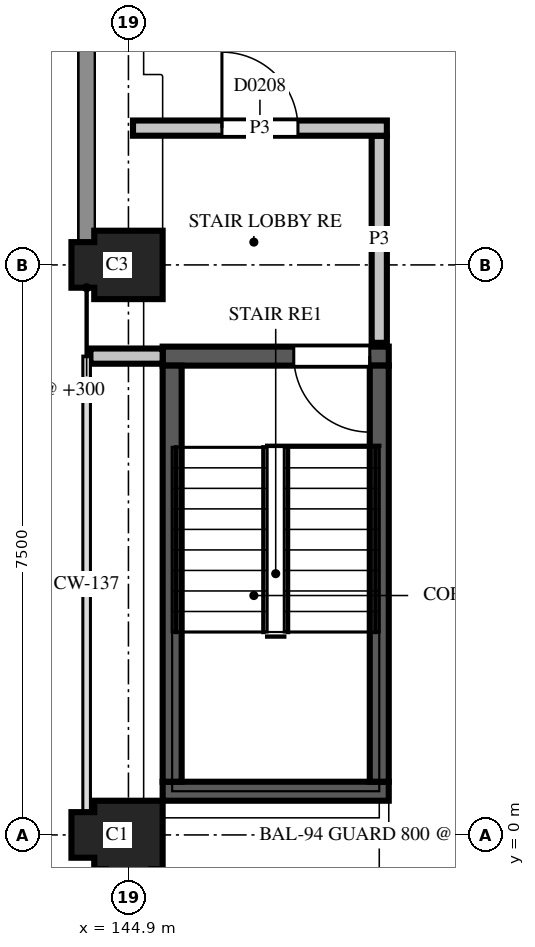
"""IFC4 building model, lengths in metres.
Left out: names, types, materials, properties, quantities, classifications, styles, units other than length and angle.
Written with IfcOpenShell. Run it as: python <this file> out.ifc"""

import sys

from ifc_helpers import new_model, si_unit, direction, frame, frame_2d, origin, place, context, subcontext, project, spatial, polyline, rectangle, outline, extrude, element, fill, save


model = new_model("IFC4")
c1 = context("Model", 3, precision=1e-05, world=origin(), true_north=direction((0.0, 1.0)))
c2 = subcontext(c1, "Body", "Model", "MODEL_VIEW")
j1 = project(units=[si_unit("LENGTHUNIT", "METRE"), si_unit("PLANEANGLEUNIT", "RADIAN")], contexts=[c1])
p1 = place(None, origin())
s1 = spatial("IfcSite", under=j1, at=p1, CompositionType="ELEMENT")
p2 = place(p1, origin())
s2 = spatial("IfcBuilding", under=s1, at=p2, CompositionType="ELEMENT")
p3 = place(p2, frame((0.0, 0.0, 8.2)))
s3 = spatial("IfcBuildingStorey", under=s2, at=p3, CompositionType="ELEMENT", Elevation=8.2)
p4 = place(p3, frame((144.9, 0.0, 0.0), z_axis=(0.0, 0.0, 1.0), x_axis=(-1.0, 0.0, 0.0)))
e1 = element("IfcColumn", 1, at=p4, inside=s3, PredefinedType="COLUMN", context=c2, shape_type="SweptSolid", body=[
    extrude(outline(polyline([(-0.45, -0.45), (0.45, -0.45), (0.45, -0.3), (0.75, -0.3), (0.75, 0.3), (0.45, 0.3), (0.45, 0.45), (0.3, 0.45), (0.3, 0.75), (-0.3, 0.75), (-0.3, 0.45), (-0.45, 0.45), (-0.45, -0.45)])), origin(), (0.0, 0.0, 1.0), 3.7),
])
p5 = place(p3, frame((144.9, 7.5, 0.0), z_axis=(0.0, 0.0, 1.0), x_axis=(-1.0, 0.0, 0.0)))
e2 = element("IfcColumn", 2, at=p5, inside=s3, PredefinedType="COLUMN", context=c2, shape_type="SweptSolid", body=[
    extrude(outline(polyline([(-0.45, -0.45), (0.45, -0.45), (0.45, -0.3), (0.75, -0.3), (0.75, 0.3), (0.45, 0.3), (0.45, 0.45), (-0.45, 0.45), (-0.45, -0.45)])), origin(), (0.0, 0.0, 1.0), 3.7),
])
p6 = place(p3, frame((145.35, 0.575, 0.0), z_axis=(0.0, 0.0, 1.0), x_axis=(1.0, 0.0, 0.0)))
e3 = element("IfcWall", 3, at=p6, inside=s3, PredefinedType="SHEAR", context=c2, shape_type="SweptSolid", body=[
    extrude(rectangle(XDim=2.975, YDim=0.25, at=frame_2d((1.487, 0.0))), origin(), (0.0, 0.0, 1.0), 3.7),
])
p7 = place(p3, frame((145.35, 6.3, 0.0), z_axis=(0.0, 0.0, 1.0), x_axis=(1.0, 0.0, 0.0)))
e4 = element("IfcWall", 4, at=p7, inside=s3, PredefinedType="SHEAR", context=c2, shape_type="SweptSolid", body=[
    extrude(rectangle(XDim=2.975, YDim=0.25, at=frame_2d((1.487, 0.0))), origin(), (0.0, 0.0, 1.0), 3.7),
])
p8 = place(p7, frame((1.725, 0.0, 0.0)))
e5 = element("IfcOpeningElement", 5, at=p8, cuts=e4, PredefinedType="OPENING", context=c2, shape_type="SweptSolid", body=[
    extrude(rectangle(XDim=1.0, YDim=2.1, at=frame_2d((0.5, 1.05))), frame((0.0, 0.135, 0.0), z_axis=(0.0, -1.0, 0.0), x_axis=(1.0, 0.0, 0.0)), (0.0, 0.0, 1.0), 0.27),
])
for number, where, z_axis, x_axis in (
    (6, (145.475, 0.7, 0.0), (0.0, 0.0, 1.0), (0.0, 1.0, 0.0)),
    (7, (148.2, 0.7, 0.0), (0.0, 0.0, 1.0), (0.0, 1.0, 0.0)),
):
    element("IfcWall", number, at=place(p3, frame(where, z_axis=z_axis, x_axis=x_axis)), inside=s3, PredefinedType="SHEAR", context=c2, shape_type="SweptSolid", body=[
        extrude(rectangle(XDim=5.475, YDim=0.25, at=frame_2d((2.738, 0.0))), origin(), (0.0, 0.0, 1.0), 3.7),
    ])
p9 = place(p3, frame((144.4, 6.3, 0.0), z_axis=(0.0, 0.0, 1.0), x_axis=(1.0, 0.0, 0.0)))
e8 = element("IfcWall", 8, at=p9, inside=s3, PredefinedType="PARTITIONING", context=c2, shape_type="SweptSolid", body=[
    extrude(rectangle(XDim=0.95, YDim=0.2, at=frame_2d((0.475, 0.0))), origin(), (0.0, 0.0, 1.0), 2.88),
])
p10 = place(p3, frame((148.2, 6.475, 0.0), z_axis=(0.0, 0.0, 1.0), x_axis=(0.0, 1.0, 0.0)))
e9 = element("IfcWall", 9, at=p10, inside=s3, PredefinedType="PARTITIONING", context=c2, shape_type="SweptSolid", body=[
    extrude(rectangle(XDim=2.725, YDim=0.2, at=frame_2d((1.362, 0.0))), origin(), (0.0, 0.0, 1.0), 2.88),
])
p11 = place(p3, frame((148.3, 9.3, 0.0), z_axis=(0.0, 0.0, 1.0), x_axis=(-1.0, 0.0, 0.0)))
e10 = element("IfcWall", 10, at=p11, inside=s3, PredefinedType="PARTITIONING", context=c2, shape_type="SweptSolid", body=[
    extrude(rectangle(XDim=3.34, YDim=0.2, at=frame_2d((1.67, 0.0))), origin(), (0.0, 0.0, 1.0), 2.88),
])
p12 = place(p11, frame((1.17, 0.0, 0.0)))
e11 = element("IfcOpeningElement", 11, at=p12, cuts=e10, PredefinedType="OPENING", context=c2, shape_type="SweptSolid", body=[
    extrude(rectangle(XDim=1.0, YDim=2.1, at=frame_2d((0.5, 1.05))), frame((0.0, 0.11, 0.0), z_axis=(0.0, -1.0, 0.0), x_axis=(1.0, 0.0, 0.0)), (0.0, 0.0, 1.0), 0.22),
])
p13 = place(p12, origin())
e12 = element("IfcDoor", 12, at=p13, inside=s3, OperationType="SINGLE_SWING_RIGHT", PredefinedType="DOOR", context=c2, shape_type="SweptSolid", body=[
    extrude(rectangle(XDim=1.0, YDim=2.1, at=frame_2d((0.5, 1.05))), frame((0.0, 0.025, 0.0), z_axis=(0.0, -1.0, 0.0), x_axis=(1.0, 0.0, 0.0)), (0.0, 0.0, 1.0), 0.05),
])
fill(e11, e12)
p14 = place(p8, origin())
e13 = element("IfcDoor", 13, at=p14, inside=s3, OperationType="SINGLE_SWING_RIGHT", PredefinedType="DOOR", context=c2, shape_type="SweptSolid", body=[
    extrude(rectangle(XDim=1.0, YDim=2.1, at=frame_2d((0.5, 1.05))), frame((0.0, 0.025, 0.0), z_axis=(0.0, -1.0, 0.0), x_axis=(1.0, 0.0, 0.0)), (0.0, 0.0, 1.0), 0.05),
])
fill(e5, e13)
save(model, sys.argv[1])
